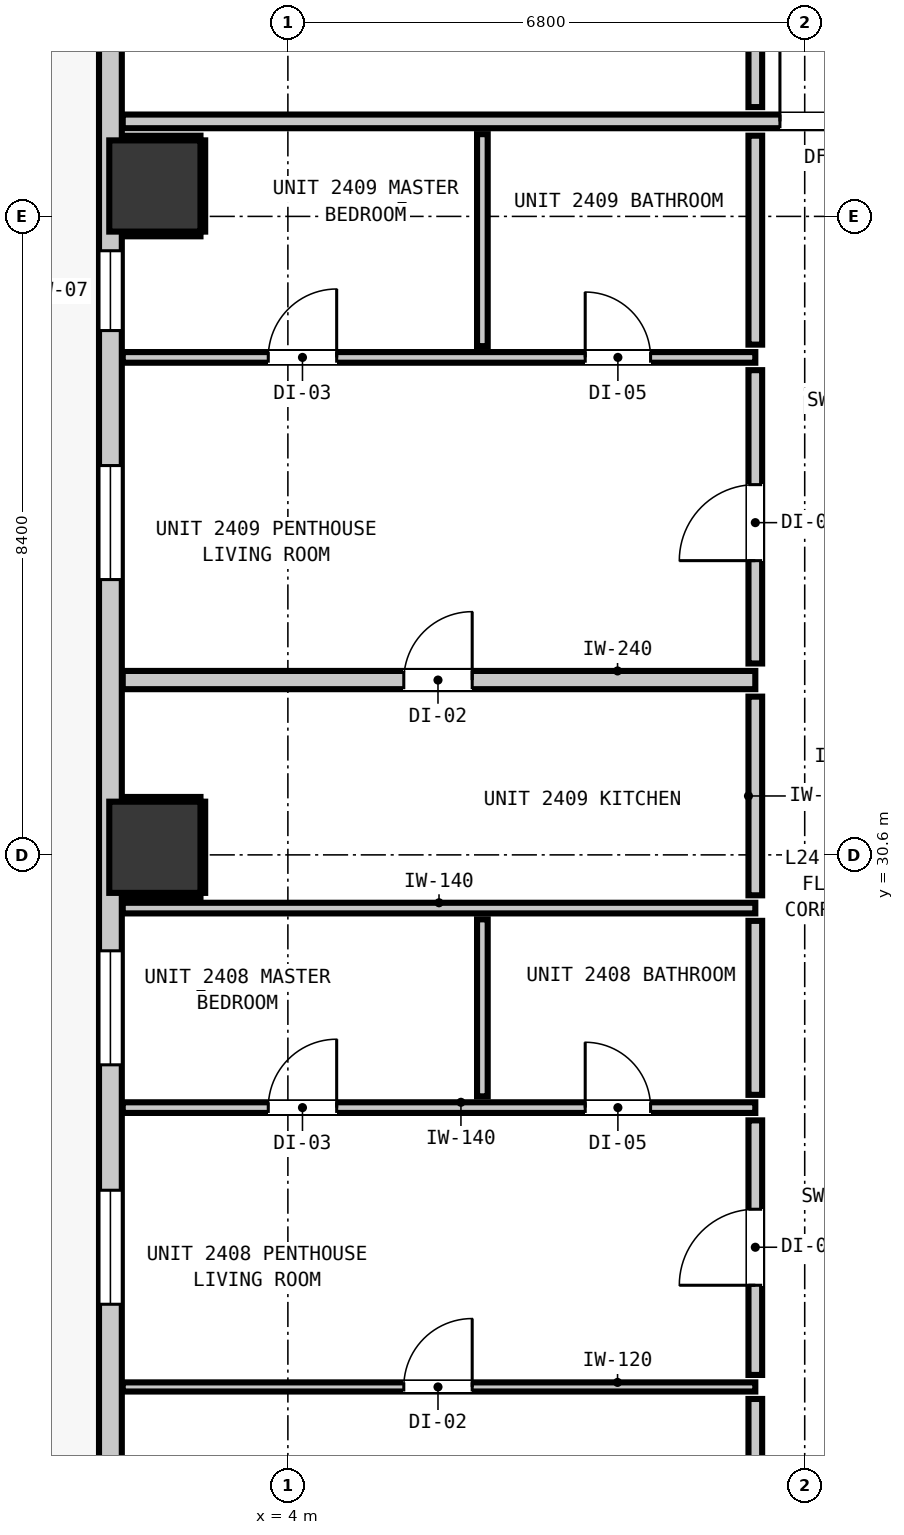
"""IFC4 building model, lengths in metres.
Left out: names, types, materials, properties, quantities, classifications, styles, units other than length and angle.
Written with IfcOpenShell. Run it as: python <this file> out.ifc"""

import sys

from ifc_helpers import new_model, si_unit, direction, frame, frame_2d, origin, origin_2d, place, context, subcontext, project, spatial, rectangle, extrude, element, fill, save


model = new_model("IFC4")
c1 = context("Model", 3, precision=1e-05, world=origin(), true_north=direction((0.0, 1.0)))
c2 = subcontext(c1, "Body", "Model", "MODEL_VIEW")
j1 = project(units=[si_unit("LENGTHUNIT", "METRE"), si_unit("PLANEANGLEUNIT", "RADIAN")], contexts=[c1])
p1 = place(None, origin())
s1 = spatial("IfcSite", under=j1, at=p1, CompositionType="ELEMENT")
p2 = place(p1, origin())
s2 = spatial("IfcBuilding", under=s1, at=p2, CompositionType="ELEMENT")
p3 = place(p2, frame((0.0, 0.0, 85.08)))
s3 = spatial("IfcBuildingStorey", under=s2, at=p3, CompositionType="ELEMENT", Elevation=85.08)
for number, where, z_axis, x_axis in (
    (1, (2.25, 30.7, 0.0), (0.0, 0.0, 1.0), (1.0, 0.0, 0.0)),
    (2, (2.25, 39.4, 0.0), (0.0, 0.0, 1.0), (1.0, 0.0, 0.0)),
):
    element("IfcColumn", number, at=place(p3, frame(where, z_axis=z_axis, x_axis=x_axis)), inside=s3, PredefinedType="COLUMN", context=c2, shape_type="SweptSolid", body=[
        extrude(rectangle(XDim=1.2, YDim=1.2, at=origin_2d()), origin(), (0.0, 0.0, 1.0), 3.32),
    ])
p4 = place(p3, frame((1.665, 16.365, 0.0), z_axis=(0.0, 0.0, 1.0), x_axis=(0.0, 1.0, 0.0)))
e3 = element("IfcWall", 3, at=p4, inside=s3, PredefinedType="STANDARD", context=c2, shape_type="SweptSolid", body=[
    extrude(rectangle(XDim=34.67, YDim=0.3, at=frame_2d((17.335, 0.0))), origin(), (0.0, 0.0, 1.0), 2.96),
])
p5 = place(p4, frame((1.251, 0.0, 0.0)))
e4 = element("IfcOpeningElement", 4, at=p5, cuts=e3, PredefinedType="OPENING", context=c2, shape_type="SweptSolid", body=[
    extrude(rectangle(XDim=1.0, YDim=2.15, at=frame_2d((0.5, 1.075))), frame((0.0, 0.16, 0.0), z_axis=(0.0, -1.0, 0.0), x_axis=(1.0, 0.0, 0.0)), (0.0, 0.0, 1.0), 0.32),
])
p6 = place(p4, frame((32.508, 0.0, 0.85)))
e5 = element("IfcOpeningElement", 5, at=p6, cuts=e3, PredefinedType="OPENING", context=c2, shape_type="SweptSolid", body=[
    extrude(rectangle(XDim=1.5, YDim=1.8, at=frame_2d((0.75, 0.9))), frame((0.0, 0.16, 0.0), z_axis=(0.0, -1.0, 0.0), x_axis=(1.0, 0.0, 0.0)), (0.0, 0.0, 1.0), 0.32),
])
p7 = place(p4, frame((8.323, 0.0, 0.85)))
e6 = element("IfcOpeningElement", 6, at=p7, cuts=e3, PredefinedType="OPENING", context=c2, shape_type="SweptSolid", body=[
    extrude(rectangle(XDim=1.5, YDim=1.8, at=frame_2d((0.75, 0.9))), frame((0.0, 0.16, 0.0), z_axis=(0.0, -1.0, 0.0), x_axis=(1.0, 0.0, 0.0)), (0.0, 0.0, 1.0), 0.32),
])
p8 = place(p4, frame((11.473, 0.0, 0.85)))
e7 = element("IfcOpeningElement", 7, at=p8, cuts=e3, PredefinedType="OPENING", context=c2, shape_type="SweptSolid", body=[
    extrude(rectangle(XDim=1.5, YDim=1.8, at=frame_2d((0.75, 0.9))), frame((0.0, 0.16, 0.0), z_axis=(0.0, -1.0, 0.0), x_axis=(1.0, 0.0, 0.0)), (0.0, 0.0, 1.0), 0.32),
])
p9 = place(p4, frame((17.857, 0.0, 0.85)))
e8 = element("IfcOpeningElement", 8, at=p9, cuts=e3, PredefinedType="OPENING", context=c2, shape_type="SweptSolid", body=[
    extrude(rectangle(XDim=1.5, YDim=1.8, at=frame_2d((0.75, 0.9))), frame((0.0, 0.16, 0.0), z_axis=(0.0, -1.0, 0.0), x_axis=(1.0, 0.0, 0.0)), (0.0, 0.0, 1.0), 0.32),
])
p10 = place(p4, frame((21.133, 0.0, 0.85)))
e9 = element("IfcOpeningElement", 9, at=p10, cuts=e3, PredefinedType="OPENING", context=c2, shape_type="SweptSolid", body=[
    extrude(rectangle(XDim=1.05, YDim=1.65, at=frame_2d((0.525, 0.825))), frame((0.0, 0.16, 0.0), z_axis=(0.0, -1.0, 0.0), x_axis=(1.0, 0.0, 0.0)), (0.0, 0.0, 1.0), 0.32),
])
p11 = place(p3, frame((1.827, 32.9, 0.0), z_axis=(0.0, 0.0, 1.0), x_axis=(1.0, 0.0, 0.0)))
e10 = element("IfcWall", 10, at=p11, inside=s3, PredefinedType="PARTITIONING", context=c2, shape_type="SweptSolid", body=[
    extrude(rectangle(XDim=8.323, YDim=0.24, at=frame_2d((4.162, 0.0))), origin(), (0.0, 0.0, 1.0), 2.96),
])
p12 = place(p11, frame((3.698, 0.0, 0.0)))
e11 = element("IfcOpeningElement", 11, at=p12, cuts=e10, PredefinedType="OPENING", context=c2, shape_type="SweptSolid", body=[
    extrude(rectangle(XDim=0.9, YDim=2.1, at=frame_2d((0.45, 1.05))), frame((0.0, 0.13, 0.0), z_axis=(0.0, -1.0, 0.0), x_axis=(1.0, 0.0, 0.0)), (0.0, 0.0, 1.0), 0.26),
])
p13 = place(p3, frame((1.827, 40.25, 0.0), z_axis=(0.0, 0.0, 1.0), x_axis=(1.0, 0.0, 0.0)))
e12 = element("IfcWall", 12, at=p13, inside=s3, PredefinedType="PARTITIONING", context=c2, shape_type="SweptSolid", body=[
    extrude(rectangle(XDim=42.146, YDim=0.18, at=frame_2d((21.073, 0.0))), origin(), (0.0, 0.0, 1.0), 2.96),
])
p14 = place(p13, frame((15.608, 0.0, 0.0)))
e13 = element("IfcOpeningElement", 13, at=p14, cuts=e12, PredefinedType="OPENING", context=c2, shape_type="SweptSolid", body=[
    extrude(rectangle(XDim=1.4, YDim=2.15, at=frame_2d((0.7, 1.075))), frame((0.0, 0.1, 0.0), z_axis=(0.0, -1.0, 0.0), x_axis=(1.0, 0.0, 0.0)), (0.0, 0.0, 1.0), 0.2),
])
p15 = place(p13, frame((8.647, 0.0, 0.0)))
e14 = element("IfcOpeningElement", 14, at=p15, cuts=e12, PredefinedType="OPENING", context=c2, shape_type="SweptSolid", body=[
    extrude(rectangle(XDim=1.4, YDim=2.15, at=frame_2d((0.7, 1.075))), frame((0.0, 0.1, 0.0), z_axis=(0.0, -1.0, 0.0), x_axis=(1.0, 0.0, 0.0)), (0.0, 0.0, 1.0), 0.2),
])
p16 = place(p13, frame((38.524, 0.0, 0.0)))
e15 = element("IfcOpeningElement", 15, at=p16, cuts=e12, PredefinedType="OPENING", context=c2, shape_type="SweptSolid", body=[
    extrude(rectangle(XDim=1.0, YDim=2.15, at=frame_2d((0.5, 1.075))), frame((0.0, 0.1, 0.0), z_axis=(0.0, -1.0, 0.0), x_axis=(1.0, 0.0, 0.0)), (0.0, 0.0, 1.0), 0.2),
])
p17 = place(p3, frame((1.827, 27.275, 0.0), z_axis=(0.0, 0.0, 1.0), x_axis=(1.0, 0.0, 0.0)))
e16 = element("IfcWall", 16, at=p17, inside=s3, PredefinedType="PARTITIONING", context=c2, shape_type="SweptSolid", body=[
    extrude(rectangle(XDim=8.323, YDim=0.14, at=frame_2d((4.162, 0.0))), origin(), (0.0, 0.0, 1.0), 2.96),
])
p18 = place(p17, frame((6.085, 0.0, 0.0)))
e17 = element("IfcOpeningElement", 17, at=p18, cuts=e16, PredefinedType="OPENING", context=c2, shape_type="SweptSolid", body=[
    extrude(rectangle(XDim=0.86, YDim=2.02, at=frame_2d((0.43, 1.01))), frame((0.0, 0.08, 0.0), z_axis=(0.0, -1.0, 0.0), x_axis=(1.0, 0.0, 0.0)), (0.0, 0.0, 1.0), 0.16),
])
p19 = place(p17, frame((1.915, 0.0, 0.0)))
e18 = element("IfcOpeningElement", 18, at=p19, cuts=e16, PredefinedType="OPENING", context=c2, shape_type="SweptSolid", body=[
    extrude(rectangle(XDim=0.9, YDim=2.1, at=frame_2d((0.45, 1.05))), frame((0.0, 0.08, 0.0), z_axis=(0.0, -1.0, 0.0), x_axis=(1.0, 0.0, 0.0)), (0.0, 0.0, 1.0), 0.16),
])
p20 = place(p3, frame((1.827, 29.9, 0.0), z_axis=(0.0, 0.0, 1.0), x_axis=(1.0, 0.0, 0.0)))
e19 = element("IfcWall", 19, at=p20, inside=s3, PredefinedType="PARTITIONING", context=c2, shape_type="SweptSolid", body=[
    extrude(rectangle(XDim=8.323, YDim=0.14, at=frame_2d((4.162, 0.0))), origin(), (0.0, 0.0, 1.0), 2.96),
])
p21 = place(p3, frame((1.827, 37.145, 0.0), z_axis=(0.0, 0.0, 1.0), x_axis=(1.0, 0.0, 0.0)))
e20 = element("IfcWall", 20, at=p21, inside=s3, PredefinedType="PARTITIONING", context=c2, shape_type="SweptSolid", body=[
    extrude(rectangle(XDim=8.323, YDim=0.14, at=frame_2d((4.162, 0.0))), origin(), (0.0, 0.0, 1.0), 2.96),
])
p22 = place(p21, frame((6.085, 0.0, 0.0)))
e21 = element("IfcOpeningElement", 21, at=p22, cuts=e20, PredefinedType="OPENING", context=c2, shape_type="SweptSolid", body=[
    extrude(rectangle(XDim=0.86, YDim=2.02, at=frame_2d((0.43, 1.01))), frame((0.0, 0.08, 0.0), z_axis=(0.0, -1.0, 0.0), x_axis=(1.0, 0.0, 0.0)), (0.0, 0.0, 1.0), 0.16),
])
p23 = place(p21, frame((1.915, 0.0, 0.0)))
e22 = element("IfcOpeningElement", 22, at=p23, cuts=e20, PredefinedType="OPENING", context=c2, shape_type="SweptSolid", body=[
    extrude(rectangle(XDim=0.9, YDim=2.1, at=frame_2d((0.45, 1.05))), frame((0.0, 0.08, 0.0), z_axis=(0.0, -1.0, 0.0), x_axis=(1.0, 0.0, 0.0)), (0.0, 0.0, 1.0), 0.16),
])
p24 = place(p3, frame((1.827, 23.6, 0.0), z_axis=(0.0, 0.0, 1.0), x_axis=(1.0, 0.0, 0.0)))
e23 = element("IfcWall", 23, at=p24, inside=s3, PredefinedType="PARTITIONING", context=c2, shape_type="SweptSolid", body=[
    extrude(rectangle(XDim=8.323, YDim=0.12, at=frame_2d((4.162, 0.0))), origin(), (0.0, 0.0, 1.0), 2.96),
])
p25 = place(p24, frame((3.698, 0.0, 0.0)))
e24 = element("IfcOpeningElement", 24, at=p25, cuts=e23, PredefinedType="OPENING", context=c2, shape_type="SweptSolid", body=[
    extrude(rectangle(XDim=0.9, YDim=2.1, at=frame_2d((0.45, 1.05))), frame((0.0, 0.07, 0.0), z_axis=(0.0, -1.0, 0.0), x_axis=(1.0, 0.0, 0.0)), (0.0, 0.0, 1.0), 0.14),
])
p26 = place(p3, frame((10.15, 21.368, 0.0), z_axis=(0.0, 0.0, 1.0), x_axis=(0.0, 1.0, 0.0)))
e25 = element("IfcWall", 25, at=p26, inside=s3, PredefinedType="PARTITIONING", context=c2, shape_type="SweptSolid", body=[
    extrude(rectangle(XDim=2.074, YDim=0.18, at=frame_2d((1.037, 0.0))), origin(), (0.0, 0.0, 1.0), 2.96),
])
p27 = place(p3, frame((10.15, 23.758, 0.0), z_axis=(0.0, 0.0, 1.0), x_axis=(0.0, 1.0, 0.0)))
e26 = element("IfcWall", 26, at=p27, inside=s3, PredefinedType="PARTITIONING", context=c2, shape_type="SweptSolid", body=[
    extrude(rectangle(XDim=3.349, YDim=0.18, at=frame_2d((1.674, 0.0))), origin(), (0.0, 0.0, 1.0), 2.96),
])
p28 = place(p27, frame((1.18, 0.0, 0.0)))
e27 = element("IfcOpeningElement", 27, at=p28, cuts=e26, PredefinedType="OPENING", context=c2, shape_type="SweptSolid", body=[
    extrude(rectangle(XDim=1.0, YDim=2.15, at=frame_2d((0.5, 1.075))), frame((0.0, 0.1, 0.0), z_axis=(0.0, -1.0, 0.0), x_axis=(1.0, 0.0, 0.0)), (0.0, 0.0, 1.0), 0.2),
])
p29 = place(p3, frame((10.15, 27.443, 0.0), z_axis=(0.0, 0.0, 1.0), x_axis=(0.0, 1.0, 0.0)))
e28 = element("IfcWall", 28, at=p29, inside=s3, PredefinedType="PARTITIONING", context=c2, shape_type="SweptSolid", body=[
    extrude(rectangle(XDim=2.289, YDim=0.18, at=frame_2d((1.145, 0.0))), origin(), (0.0, 0.0, 1.0), 2.96),
])
p30 = place(p3, frame((10.15, 30.068, 0.0), z_axis=(0.0, 0.0, 1.0), x_axis=(0.0, 1.0, 0.0)))
e29 = element("IfcWall", 29, at=p30, inside=s3, PredefinedType="PARTITIONING", context=c2, shape_type="SweptSolid", body=[
    extrude(rectangle(XDim=2.614, YDim=0.18, at=frame_2d((1.307, 0.0))), origin(), (0.0, 0.0, 1.0), 2.96),
])
p31 = place(p3, frame((10.15, 33.118, 0.0), z_axis=(0.0, 0.0, 1.0), x_axis=(0.0, 1.0, 0.0)))
e30 = element("IfcWall", 30, at=p31, inside=s3, PredefinedType="PARTITIONING", context=c2, shape_type="SweptSolid", body=[
    extrude(rectangle(XDim=3.859, YDim=0.18, at=frame_2d((1.93, 0.0))), origin(), (0.0, 0.0, 1.0), 2.96),
])
p32 = place(p31, frame((1.353, 0.0, 0.0)))
e31 = element("IfcOpeningElement", 31, at=p32, cuts=e30, PredefinedType="OPENING", context=c2, shape_type="SweptSolid", body=[
    extrude(rectangle(XDim=1.0, YDim=2.15, at=frame_2d((0.5, 1.075))), frame((0.0, 0.1, 0.0), z_axis=(0.0, -1.0, 0.0), x_axis=(1.0, 0.0, 0.0)), (0.0, 0.0, 1.0), 0.2),
])
p33 = place(p3, frame((10.15, 37.313, 0.0), z_axis=(0.0, 0.0, 1.0), x_axis=(0.0, 1.0, 0.0)))
e32 = element("IfcWall", 32, at=p33, inside=s3, PredefinedType="PARTITIONING", context=c2, shape_type="SweptSolid", body=[
    extrude(rectangle(XDim=2.749, YDim=0.18, at=frame_2d((1.375, 0.0))), origin(), (0.0, 0.0, 1.0), 2.96),
])
p34 = place(p3, frame((10.15, 40.438, 0.0), z_axis=(0.0, 0.0, 1.0), x_axis=(0.0, 1.0, 0.0)))
e33 = element("IfcWall", 33, at=p34, inside=s3, PredefinedType="PARTITIONING", context=c2, shape_type="SweptSolid", body=[
    extrude(rectangle(XDim=1.324, YDim=0.18, at=frame_2d((0.662, 0.0))), origin(), (0.0, 0.0, 1.0), 2.96),
])
p35 = place(p3, frame((6.559, 27.423, 0.0), z_axis=(0.0, 0.0, 1.0), x_axis=(0.0, 1.0, 0.0)))
e34 = element("IfcWall", 34, at=p35, inside=s3, PredefinedType="PARTITIONING", context=c2, shape_type="SweptSolid", body=[
    extrude(rectangle(XDim=2.329, YDim=0.14, at=frame_2d((1.165, 0.0))), origin(), (0.0, 0.0, 1.0), 2.96),
])
p36 = place(p3, frame((6.559, 37.293, 0.0), z_axis=(0.0, 0.0, 1.0), x_axis=(0.0, 1.0, 0.0)))
e35 = element("IfcWall", 35, at=p36, inside=s3, PredefinedType="PARTITIONING", context=c2, shape_type="SweptSolid", body=[
    extrude(rectangle(XDim=2.789, YDim=0.14, at=frame_2d((1.395, 0.0))), origin(), (0.0, 0.0, 1.0), 2.96),
])
for number, where, z_axis, x_axis in (
    (36, (1.83, 30.068, 0.0), (0.0, 0.0, 1.0), (1.0, 0.0, 0.0)),
    (37, (1.83, 31.332, 0.0), (0.0, 0.0, 1.0), (1.0, 0.0, 0.0)),
):
    element("IfcWall", number, at=place(p3, frame(where, z_axis=z_axis, x_axis=x_axis)), inside=s3, PredefinedType="PARTITIONING", context=c2, shape_type="SweptSolid", body=[
        extrude(rectangle(XDim=1.02, YDim=0.06, at=frame_2d((0.51, 0.0))), origin(), (0.0, 0.0, 1.0), 1.45),
    ])
p37 = place(p3, frame((2.882, 30.1, 0.0), z_axis=(0.0, 0.0, 1.0), x_axis=(0.0, 1.0, 0.0)))
e38 = element("IfcWall", 38, at=p37, inside=s3, PredefinedType="PARTITIONING", context=c2, shape_type="SweptSolid", body=[
    extrude(rectangle(XDim=1.2, YDim=0.06, at=frame_2d((0.6, 0.0))), origin(), (0.0, 0.0, 1.0), 1.45),
])
for number, where, z_axis, x_axis in (
    (39, (1.83, 38.768, 0.0), (0.0, 0.0, 1.0), (1.0, 0.0, 0.0)),
    (40, (1.83, 40.032, 0.0), (0.0, 0.0, 1.0), (1.0, 0.0, 0.0)),
):
    element("IfcWall", number, at=place(p3, frame(where, z_axis=z_axis, x_axis=x_axis)), inside=s3, PredefinedType="PARTITIONING", context=c2, shape_type="SweptSolid", body=[
        extrude(rectangle(XDim=1.02, YDim=0.06, at=frame_2d((0.51, 0.0))), origin(), (0.0, 0.0, 1.0), 1.45),
    ])
p38 = place(p3, frame((2.882, 38.8, 0.0), z_axis=(0.0, 0.0, 1.0), x_axis=(0.0, 1.0, 0.0)))
e41 = element("IfcWall", 41, at=p38, inside=s3, PredefinedType="PARTITIONING", context=c2, shape_type="SweptSolid", body=[
    extrude(rectangle(XDim=1.2, YDim=0.06, at=frame_2d((0.6, 0.0))), origin(), (0.0, 0.0, 1.0), 1.45),
])
p39 = place(p7, origin())
e42 = element("IfcWindow", 42, at=p39, inside=s3, PartitioningType="SINGLE_PANEL", PredefinedType="WINDOW", context=c2, shape_type="SweptSolid", body=[
    extrude(rectangle(XDim=1.5, YDim=1.8, at=frame_2d((0.75, 0.9))), frame((0.0, 0.03, 0.0), z_axis=(0.0, -1.0, 0.0), x_axis=(1.0, 0.0, 0.0)), (0.0, 0.0, 1.0), 0.06),
])
fill(e6, e42)
p40 = place(p8, origin())
e43 = element("IfcWindow", 43, at=p40, inside=s3, PartitioningType="SINGLE_PANEL", PredefinedType="WINDOW", context=c2, shape_type="SweptSolid", body=[
    extrude(rectangle(XDim=1.5, YDim=1.8, at=frame_2d((0.75, 0.9))), frame((0.0, 0.03, 0.0), z_axis=(0.0, -1.0, 0.0), x_axis=(1.0, 0.0, 0.0)), (0.0, 0.0, 1.0), 0.06),
])
fill(e7, e43)
p41 = place(p9, origin())
e44 = element("IfcWindow", 44, at=p41, inside=s3, PartitioningType="SINGLE_PANEL", PredefinedType="WINDOW", context=c2, shape_type="SweptSolid", body=[
    extrude(rectangle(XDim=1.5, YDim=1.8, at=frame_2d((0.75, 0.9))), frame((0.0, 0.03, 0.0), z_axis=(0.0, -1.0, 0.0), x_axis=(1.0, 0.0, 0.0)), (0.0, 0.0, 1.0), 0.06),
])
fill(e8, e44)
p42 = place(p10, origin())
e45 = element("IfcWindow", 45, at=p42, inside=s3, PartitioningType="SINGLE_PANEL", PredefinedType="WINDOW", context=c2, shape_type="SweptSolid", body=[
    extrude(rectangle(XDim=1.05, YDim=1.65, at=frame_2d((0.525, 0.825))), frame((0.0, 0.03, 0.0), z_axis=(0.0, -1.0, 0.0), x_axis=(1.0, 0.0, 0.0)), (0.0, 0.0, 1.0), 0.06),
])
fill(e9, e45)
p43 = place(p15, origin())
e46 = element("IfcDoor", 46, at=p43, inside=s3, OperationType="SINGLE_SWING_LEFT", PredefinedType="DOOR", context=c2, shape_type="SweptSolid", body=[
    extrude(rectangle(XDim=1.4, YDim=2.15, at=frame_2d((0.7, 1.075))), frame((0.0, 0.025, 0.0), z_axis=(0.0, -1.0, 0.0), x_axis=(1.0, 0.0, 0.0)), (0.0, 0.0, 1.0), 0.05),
])
fill(e14, e46)
p44 = place(p28, origin())
e47 = element("IfcDoor", 47, at=p44, inside=s3, OperationType="SINGLE_SWING_LEFT", PredefinedType="DOOR", context=c2, shape_type="SweptSolid", body=[
    extrude(rectangle(XDim=1.0, YDim=2.15, at=frame_2d((0.5, 1.075))), frame((0.0, 0.025, 0.0), z_axis=(0.0, -1.0, 0.0), x_axis=(1.0, 0.0, 0.0)), (0.0, 0.0, 1.0), 0.05),
])
fill(e27, e47)
p45 = place(p25, origin())
e48 = element("IfcDoor", 48, at=p45, inside=s3, OperationType="SINGLE_SWING_RIGHT", PredefinedType="DOOR", context=c2, shape_type="SweptSolid", body=[
    extrude(rectangle(XDim=0.9, YDim=2.1, at=frame_2d((0.45, 1.05))), frame((0.0, 0.025, 0.0), z_axis=(0.0, -1.0, 0.0), x_axis=(1.0, 0.0, 0.0)), (0.0, 0.0, 1.0), 0.05),
])
fill(e24, e48)
p46 = place(p18, origin())
e49 = element("IfcDoor", 49, at=p46, inside=s3, OperationType="SINGLE_SWING_LEFT", PredefinedType="DOOR", context=c2, shape_type="SweptSolid", body=[
    extrude(rectangle(XDim=0.86, YDim=2.02, at=frame_2d((0.43, 1.01))), frame((0.0, 0.025, 0.0), z_axis=(0.0, -1.0, 0.0), x_axis=(1.0, 0.0, 0.0)), (0.0, 0.0, 1.0), 0.05),
])
fill(e17, e49)
p47 = place(p19, origin())
e50 = element("IfcDoor", 50, at=p47, inside=s3, OperationType="SINGLE_SWING_RIGHT", PredefinedType="DOOR", context=c2, shape_type="SweptSolid", body=[
    extrude(rectangle(XDim=0.9, YDim=2.1, at=frame_2d((0.45, 1.05))), frame((0.0, 0.025, 0.0), z_axis=(0.0, -1.0, 0.0), x_axis=(1.0, 0.0, 0.0)), (0.0, 0.0, 1.0), 0.05),
])
fill(e18, e50)
p48 = place(p32, origin())
e51 = element("IfcDoor", 51, at=p48, inside=s3, OperationType="SINGLE_SWING_LEFT", PredefinedType="DOOR", context=c2, shape_type="SweptSolid", body=[
    extrude(rectangle(XDim=1.0, YDim=2.15, at=frame_2d((0.5, 1.075))), frame((0.0, 0.025, 0.0), z_axis=(0.0, -1.0, 0.0), x_axis=(1.0, 0.0, 0.0)), (0.0, 0.0, 1.0), 0.05),
])
fill(e31, e51)
p49 = place(p12, origin())
e52 = element("IfcDoor", 52, at=p49, inside=s3, OperationType="SINGLE_SWING_RIGHT", PredefinedType="DOOR", context=c2, shape_type="SweptSolid", body=[
    extrude(rectangle(XDim=0.9, YDim=2.1, at=frame_2d((0.45, 1.05))), frame((0.0, 0.025, 0.0), z_axis=(0.0, -1.0, 0.0), x_axis=(1.0, 0.0, 0.0)), (0.0, 0.0, 1.0), 0.05),
])
fill(e11, e52)
p50 = place(p22, origin())
e53 = element("IfcDoor", 53, at=p50, inside=s3, OperationType="SINGLE_SWING_LEFT", PredefinedType="DOOR", context=c2, shape_type="SweptSolid", body=[
    extrude(rectangle(XDim=0.86, YDim=2.02, at=frame_2d((0.43, 1.01))), frame((0.0, 0.025, 0.0), z_axis=(0.0, -1.0, 0.0), x_axis=(1.0, 0.0, 0.0)), (0.0, 0.0, 1.0), 0.05),
])
fill(e21, e53)
p51 = place(p23, origin())
e54 = element("IfcDoor", 54, at=p51, inside=s3, OperationType="SINGLE_SWING_RIGHT", PredefinedType="DOOR", context=c2, shape_type="SweptSolid", body=[
    extrude(rectangle(XDim=0.9, YDim=2.1, at=frame_2d((0.45, 1.05))), frame((0.0, 0.025, 0.0), z_axis=(0.0, -1.0, 0.0), x_axis=(1.0, 0.0, 0.0)), (0.0, 0.0, 1.0), 0.05),
])
fill(e22, e54)
save(model, sys.argv[1])
